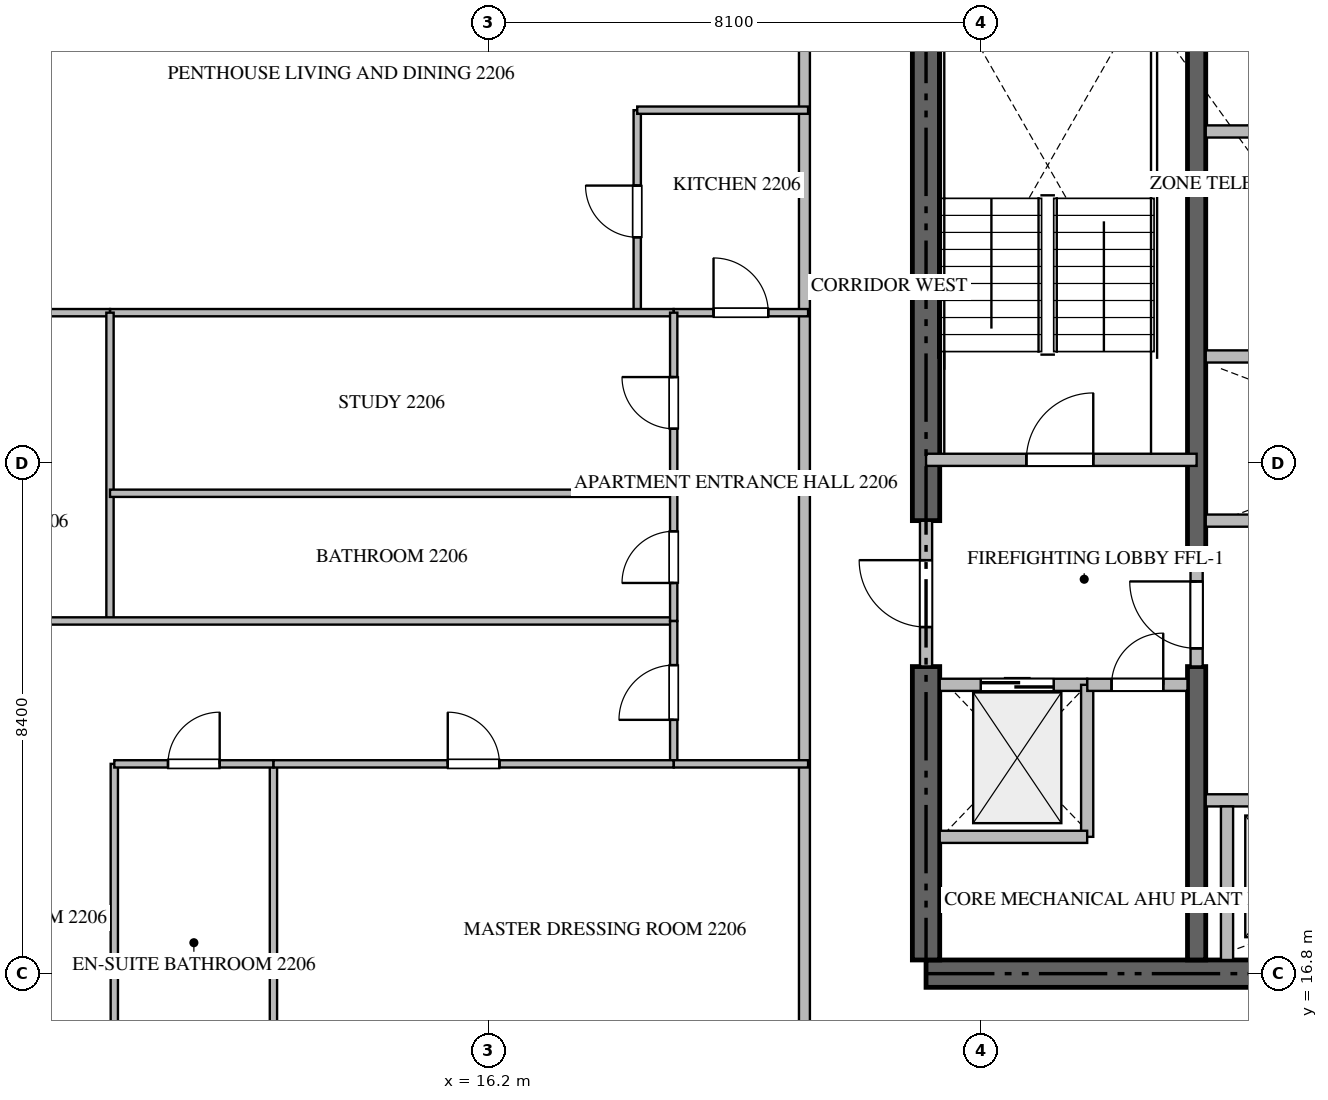
"""IFC4 building model, lengths in metres.
Left out: names, types, materials, properties, quantities, classifications, styles, units other than length and angle.
Written with IfcOpenShell. Run it as: python <this file> out.ifc"""

import sys

from ifc_helpers import new_model, si_unit, direction, frame, frame_2d, origin, place, context, subcontext, project, spatial, rectangle, extrude, source, transform, mapped, element, fill, save


model = new_model("IFC4")
c1 = context("Model", 3, precision=1e-05, world=origin(), true_north=direction((0.0, 1.0)))
c2 = subcontext(c1, "Body", "Model", "MODEL_VIEW")
j1 = project(units=[si_unit("LENGTHUNIT", "METRE"), si_unit("PLANEANGLEUNIT", "RADIAN")], contexts=[c1])
p1 = place(None, origin())
s1 = spatial("IfcSite", under=j1, at=p1, CompositionType="ELEMENT")
p2 = place(p1, origin())
s2 = spatial("IfcBuilding", under=s1, at=p2, CompositionType="ELEMENT")
p3 = place(p2, frame((0.0, 0.0, 90.45)))
s3 = spatial("IfcBuildingStorey", under=s2, at=p3, CompositionType="ELEMENT", Elevation=90.45)
p4 = place(p3, frame((23.4, 16.8, -0.26), z_axis=(0.0, 0.0, 1.0), x_axis=(1.0, 0.0, 0.0)))
e1 = element("IfcWall", 1, at=p4, inside=s3, PredefinedType="SHEAR", context=c2, shape_type="SweptSolid", body=[
    extrude(rectangle(XDim=18.0, YDim=0.45, at=frame_2d((9.0, 0.0))), origin(), (0.0, 0.0, 1.0), 3.748),
])
p5 = place(p3, frame((23.4, 17.025, -0.26), z_axis=(0.0, 0.0, 1.0), x_axis=(0.0, 1.0, 0.0)))
e2 = element("IfcWall", 2, at=p5, inside=s3, PredefinedType="SHEAR", context=c2, shape_type="SweptSolid", body=[
    extrude(rectangle(XDim=4.825, YDim=0.45, at=frame_2d((2.413, 0.0))), origin(), (0.0, 0.0, 1.0), 3.748),
])
p6 = place(p3, frame((23.4, 24.25, -0.26), z_axis=(0.0, 0.0, 1.0), x_axis=(0.0, 1.0, 0.0)))
e3 = element("IfcWall", 3, at=p6, inside=s3, PredefinedType="SHEAR", context=c2, shape_type="SweptSolid", body=[
    extrude(rectangle(XDim=9.125, YDim=0.45, at=frame_2d((4.562, 0.0))), origin(), (0.0, 0.0, 1.0), 3.748),
])
p7 = place(p3, frame((27.85, 17.025, -0.26), z_axis=(0.0, 0.0, 1.0), x_axis=(0.0, 1.0, 0.0)))
e4 = element("IfcWall", 4, at=p7, inside=s3, PredefinedType="SHEAR", context=c2, shape_type="SweptSolid", body=[
    extrude(rectangle(XDim=4.825, YDim=0.3, at=frame_2d((2.413, 0.0))), origin(), (0.0, 0.0, 1.0), 3.748),
])
p8 = place(p3, frame((27.85, 23.55, -0.26), z_axis=(0.0, 0.0, 1.0), x_axis=(0.0, 1.0, 0.0)))
e5 = element("IfcWall", 5, at=p8, inside=s3, PredefinedType="SHEAR", context=c2, shape_type="SweptSolid", body=[
    extrude(rectangle(XDim=9.825, YDim=0.3, at=frame_2d((4.913, 0.0))), origin(), (0.0, 0.0, 1.0), 3.748),
])
p9 = place(p3, frame((23.4, 25.25, 0.0), z_axis=(0.0, 0.0, 1.0), x_axis=(1.0, 0.0, 0.0)))
e6 = element("IfcWall", 6, at=p9, inside=s3, PredefinedType="STANDARD", context=c2, shape_type="SweptSolid", body=[
    extrude(rectangle(XDim=4.45, YDim=0.2, at=frame_2d((2.225, 0.0))), origin(), (0.0, 0.0, 1.0), 3.49),
])
p10 = place(p9, frame((1.65, 0.0, 0.0)))
e7 = element("IfcOpeningElement", 7, at=p10, cuts=e6, PredefinedType="OPENING", context=c2, shape_type="SweptSolid", body=[
    extrude(rectangle(XDim=1.1, YDim=2.15, at=frame_2d((0.55, 1.075))), frame((0.0, 0.11, 0.0), z_axis=(0.0, -1.0, 0.0), x_axis=(1.0, 0.0, 0.0)), (0.0, 0.0, 1.0), 0.22),
])
p11 = place(p3, frame((23.625, 21.55, 0.0), z_axis=(0.0, 0.0, 1.0), x_axis=(1.0, 0.0, 0.0)))
e8 = element("IfcWall", 8, at=p11, inside=s3, PredefinedType="STANDARD", context=c2, shape_type="SweptSolid", body=[
    extrude(rectangle(XDim=2.425, YDim=0.2, at=frame_2d((1.212, 0.0))), origin(), (0.0, 0.0, 1.0), 3.49),
])
p12 = place(p11, frame((0.675, 0.0, 0.0)))
e9 = element("IfcOpeningElement", 9, at=p12, cuts=e8, PredefinedType="OPENING", context=c2, shape_type="SweptSolid", body=[
    extrude(rectangle(XDim=1.2, YDim=2.2, at=frame_2d((0.6, 1.1))), frame((0.0, 0.11, 0.0), z_axis=(0.0, -1.0, 0.0), x_axis=(1.0, 0.0, 0.0)), (0.0, 0.0, 1.0), 0.22),
])
p13 = place(p3, frame((28.0, 19.65, 0.0), z_axis=(0.0, 0.0, 1.0), x_axis=(1.0, 0.0, 0.0)))
e10 = element("IfcWall", 10, at=p13, inside=s3, PredefinedType="STANDARD", context=c2, shape_type="SweptSolid", body=[
    extrude(rectangle(XDim=2.65, YDim=0.2, at=frame_2d((1.325, 0.0))), origin(), (0.0, 0.0, 1.0), 3.49),
])
p14 = place(p13, frame((0.9, 0.0, 0.0)))
e11 = element("IfcOpeningElement", 11, at=p14, cuts=e10, PredefinedType="OPENING", context=c2, shape_type="SweptSolid", body=[
    extrude(rectangle(XDim=1.1, YDim=2.2, at=frame_2d((0.55, 1.1))), frame((0.0, 0.11, 0.0), z_axis=(0.0, -1.0, 0.0), x_axis=(1.0, 0.0, 0.0)), (0.0, 0.0, 1.0), 0.22),
])
p15 = place(p3, frame((28.35, 17.025, 0.0), z_axis=(0.0, 0.0, 1.0), x_axis=(0.0, 1.0, 0.0)))
e12 = element("IfcWall", 12, at=p15, inside=s3, PredefinedType="STANDARD", context=c2, shape_type="SweptSolid", body=[
    extrude(rectangle(XDim=2.525, YDim=0.2, at=frame_2d((1.263, 0.0))), origin(), (0.0, 0.0, 1.0), 3.49),
])
p16 = place(p3, frame((28.0, 24.25, 0.0), z_axis=(0.0, 0.0, 1.0), x_axis=(1.0, 0.0, 0.0)))
e13 = element("IfcWall", 13, at=p16, inside=s3, PredefinedType="STANDARD", context=c2, shape_type="SweptSolid", body=[
    extrude(rectangle(XDim=2.425, YDim=0.2, at=frame_2d((1.212, 0.0))), origin(), (0.0, 0.0, 1.0), 3.49),
])
p17 = place(p3, frame((28.0, 30.65, 0.0), z_axis=(0.0, 0.0, 1.0), x_axis=(1.0, 0.0, 0.0)))
e14 = element("IfcWall", 14, at=p17, inside=s3, PredefinedType="STANDARD", context=c2, shape_type="SweptSolid", body=[
    extrude(rectangle(XDim=2.55, YDim=0.2, at=frame_2d((1.275, 0.0))), origin(), (0.0, 0.0, 1.0), 3.49),
])
p18 = place(p3, frame((26.05, 19.05, 0.0), z_axis=(0.0, 0.0, 1.0), x_axis=(0.0, 1.0, 0.0)))
e15 = element("IfcWall", 15, at=p18, inside=s3, PredefinedType="STANDARD", context=c2, shape_type="SweptSolid", body=[
    extrude(rectangle(XDim=2.5, YDim=0.2, at=frame_2d((1.25, 0.0))), origin(), (0.0, 0.0, 1.0), 3.49),
])
p19 = place(p3, frame((23.625, 19.05, 0.0), z_axis=(0.0, 0.0, 1.0), x_axis=(1.0, 0.0, 0.0)))
e16 = element("IfcWall", 16, at=p19, inside=s3, PredefinedType="STANDARD", context=c2, shape_type="SweptSolid", body=[
    extrude(rectangle(XDim=2.425, YDim=0.2, at=frame_2d((1.212, 0.0))), origin(), (0.0, 0.0, 1.0), 3.49),
])
p20 = place(p3, frame((26.052, 21.55, 0.0), z_axis=(0.0, 0.0, 1.0), x_axis=(1.0, 0.0, 0.0)))
e17 = element("IfcWall", 17, at=p20, inside=s3, PredefinedType="STANDARD", context=c2, shape_type="SweptSolid", body=[
    extrude(rectangle(XDim=1.648, YDim=0.2, at=frame_2d((0.824, 0.0))), origin(), (0.0, 0.0, 1.0), 3.49),
])
p21 = place(p20, frame((0.399, 0.0, 0.0)))
e18 = element("IfcOpeningElement", 18, at=p21, cuts=e17, PredefinedType="OPENING", context=c2, shape_type="SweptSolid", body=[
    extrude(rectangle(XDim=0.85, YDim=2.1, at=frame_2d((0.425, 1.05))), frame((0.0, 0.11, 0.0), z_axis=(0.0, -1.0, 0.0), x_axis=(1.0, 0.0, 0.0)), (0.0, 0.0, 1.0), 0.22),
])
p22 = place(p3, frame((23.4, 21.852, 0.0), z_axis=(0.0, 0.0, 1.0), x_axis=(0.0, 1.0, 0.0)))
e19 = element("IfcWall", 19, at=p22, inside=s3, PredefinedType="STANDARD", context=c2, shape_type="SweptSolid", body=[
    extrude(rectangle(XDim=2.396, YDim=0.2, at=frame_2d((1.198, 0.0))), origin(), (0.0, 0.0, 1.0), 3.49),
])
p23 = place(p22, frame((0.648, 0.0, 0.0)))
e20 = element("IfcOpeningElement", 20, at=p23, cuts=e19, PredefinedType="OPENING", context=c2, shape_type="SweptSolid", body=[
    extrude(rectangle(XDim=1.1, YDim=2.15, at=frame_2d((0.55, 1.075))), frame((0.0, 0.11, 0.0), z_axis=(0.0, -1.0, 0.0), x_axis=(1.0, 0.0, 0.0)), (0.0, 0.0, 1.0), 0.22),
])
p24 = place(p3, frame((27.85, 21.852, 0.0), z_axis=(0.0, 0.0, 1.0), x_axis=(0.0, 1.0, 0.0)))
e21 = element("IfcWall", 21, at=p24, inside=s3, PredefinedType="STANDARD", context=c2, shape_type="SweptSolid", body=[
    extrude(rectangle(XDim=1.696, YDim=0.2, at=frame_2d((0.848, 0.0))), origin(), (0.0, 0.0, 1.0), 3.49),
])
p25 = place(p24, frame((0.298, 0.0, 0.0)))
e22 = element("IfcOpeningElement", 22, at=p25, cuts=e21, PredefinedType="OPENING", context=c2, shape_type="SweptSolid", body=[
    extrude(rectangle(XDim=1.1, YDim=2.15, at=frame_2d((0.55, 1.075))), frame((0.0, 0.11, 0.0), z_axis=(0.0, -1.0, 0.0), x_axis=(1.0, 0.0, 0.0)), (0.0, 0.0, 1.0), 0.22),
])
p26 = place(p3, frame((28.0, 26.95, 0.0), z_axis=(0.0, 0.0, 1.0), x_axis=(1.0, 0.0, 0.0)))
e23 = element("IfcWall", 23, at=p26, inside=s3, PredefinedType="STANDARD", context=c2, shape_type="SweptSolid", body=[
    extrude(rectangle(XDim=6.95, YDim=0.2, at=frame_2d((3.475, 0.0))), origin(), (0.0, 0.0, 1.0), 3.49),
])
p27 = place(p3, frame((21.4, 14.9, 0.0), z_axis=(0.0, 0.0, 1.0), x_axis=(0.0, 1.0, 0.0)))
e24 = element("IfcWall", 24, at=p27, inside=s3, PredefinedType="PARTITIONING", context=c2, shape_type="SweptSolid", body=[
    extrude(rectangle(XDim=20.6, YDim=0.18, at=frame_2d((10.3, 0.0))), origin(), (0.0, 0.0, 1.0), 3.49),
])
p28 = place(p27, frame((17.64, 0.0, 0.0)))
e25 = element("IfcOpeningElement", 25, at=p28, cuts=e24, PredefinedType="OPENING", context=c2, shape_type="SweptSolid", body=[
    extrude(rectangle(XDim=1.0, YDim=2.15, at=frame_2d((0.5, 1.075))), frame((0.0, 0.1, 0.0), z_axis=(0.0, -1.0, 0.0), x_axis=(1.0, 0.0, 0.0)), (0.0, 0.0, 1.0), 0.2),
])
p29 = place(p3, frame((18.65, 27.67, 0.0), z_axis=(0.0, 0.0, 1.0), x_axis=(0.0, 1.0, 0.0)))
e26 = element("IfcWall", 26, at=p29, inside=s3, PredefinedType="PARTITIONING", context=c2, shape_type="SweptSolid", body=[
    extrude(rectangle(XDim=3.33, YDim=0.12, at=frame_2d((1.665, 0.0))), origin(), (0.0, 0.0, 1.0), 3.49),
])
p30 = place(p29, frame((1.24, 0.0, 0.0)))
e27 = element("IfcOpeningElement", 27, at=p30, cuts=e26, PredefinedType="OPENING", context=c2, shape_type="SweptSolid", body=[
    extrude(rectangle(XDim=0.85, YDim=2.1, at=frame_2d((0.425, 1.05))), frame((0.0, 0.07, 0.0), z_axis=(0.0, -1.0, 0.0), x_axis=(1.0, 0.0, 0.0)), (0.0, 0.0, 1.0), 0.14),
])
p31 = place(p3, frame((18.65, 31.0, 0.0), z_axis=(0.0, 0.0, 1.0), x_axis=(1.0, 0.0, 0.0)))
e28 = element("IfcWall", 28, at=p31, inside=s3, PredefinedType="PARTITIONING", context=c2, shape_type="SweptSolid", body=[
    extrude(rectangle(XDim=2.81, YDim=0.12, at=frame_2d((1.405, 0.0))), origin(), (0.0, 0.0, 1.0), 3.49),
])
p32 = place(p3, frame((19.25, 27.67, 0.0), z_axis=(0.0, 0.0, 1.0), x_axis=(1.0, 0.0, 0.0)))
e29 = element("IfcWall", 29, at=p32, inside=s3, PredefinedType="PARTITIONING", context=c2, shape_type="SweptSolid", body=[
    extrude(rectangle(XDim=2.21, YDim=0.12, at=frame_2d((1.105, 0.0))), origin(), (0.0, 0.0, 1.0), 3.49),
])
p33 = place(p32, frame((0.655, 0.0, 0.0)))
e30 = element("IfcOpeningElement", 30, at=p33, cuts=e29, PredefinedType="OPENING", context=c2, shape_type="SweptSolid", body=[
    extrude(rectangle(XDim=0.9, YDim=2.1, at=frame_2d((0.45, 1.05))), frame((0.0, 0.07, 0.0), z_axis=(0.0, -1.0, 0.0), x_axis=(1.0, 0.0, 0.0)), (0.0, 0.0, 1.0), 0.14),
])
p34 = place(p3, frame((6.095, 27.67, 0.0), z_axis=(0.0, 0.0, 1.0), x_axis=(1.0, 0.0, 0.0)))
e31 = element("IfcWall", 31, at=p34, inside=s3, PredefinedType="PARTITIONING", context=c2, shape_type="SweptSolid", body=[
    extrude(rectangle(XDim=3.884, YDim=0.12, at=frame_2d((1.942, 0.0))), origin(), (0.0, 0.0, 1.0), 3.49),
])
p35 = place(p34, frame((1.781, 0.0, 0.0)))
e32 = element("IfcOpeningElement", 32, at=p35, cuts=e31, PredefinedType="OPENING", context=c2, shape_type="SweptSolid", body=[
    extrude(rectangle(XDim=0.9, YDim=2.1, at=frame_2d((0.45, 1.05))), frame((0.0, 0.07, 0.0), z_axis=(0.0, -1.0, 0.0), x_axis=(1.0, 0.0, 0.0)), (0.0, 0.0, 1.0), 0.14),
])
p36 = place(p3, frame((9.981, 27.67, 0.0), z_axis=(0.0, 0.0, 1.0), x_axis=(1.0, 0.0, 0.0)))
e33 = element("IfcWall", 33, at=p36, inside=s3, PredefinedType="PARTITIONING", context=c2, shape_type="SweptSolid", body=[
    extrude(rectangle(XDim=9.267, YDim=0.12, at=frame_2d((4.634, 0.0))), origin(), (0.0, 0.0, 1.0), 3.49),
])
p37 = place(p3, frame((9.979, 22.6, 0.0), z_axis=(0.0, 0.0, 1.0), x_axis=(0.0, 1.0, 0.0)))
e34 = element("IfcWall", 34, at=p37, inside=s3, PredefinedType="PARTITIONING", context=c2, shape_type="SweptSolid", body=[
    extrude(rectangle(XDim=5.07, YDim=0.12, at=frame_2d((2.535, 0.0))), origin(), (0.0, 0.0, 1.0), 3.49),
])
p38 = place(p3, frame((6.095, 22.6, 0.0), z_axis=(0.0, 0.0, 1.0), x_axis=(1.0, 0.0, 0.0)))
e35 = element("IfcWall", 35, at=p38, inside=s3, PredefinedType="PARTITIONING", context=c2, shape_type="SweptSolid", body=[
    extrude(rectangle(XDim=13.155, YDim=0.12, at=frame_2d((6.578, 0.0))), origin(), (0.0, 0.0, 1.0), 3.49),
])
p39 = place(p3, frame((9.979, 24.7, 0.0), z_axis=(0.0, 0.0, 1.0), x_axis=(1.0, 0.0, 0.0)))
e36 = element("IfcWall", 36, at=p39, inside=s3, PredefinedType="PARTITIONING", context=c2, shape_type="SweptSolid", body=[
    extrude(rectangle(XDim=9.271, YDim=0.12, at=frame_2d((4.635, 0.0))), origin(), (0.0, 0.0, 1.0), 3.49),
])
p40 = place(p3, frame((19.25, 22.6, 0.0), z_axis=(0.0, 0.0, 1.0), x_axis=(0.0, 1.0, 0.0)))
e37 = element("IfcWall", 37, at=p40, inside=s3, PredefinedType="PARTITIONING", context=c2, shape_type="SweptSolid", body=[
    extrude(rectangle(XDim=2.1, YDim=0.12, at=frame_2d((1.05, 0.0))), origin(), (0.0, 0.0, 1.0), 3.49),
])
p41 = place(p40, frame((0.625, 0.0, 0.0)))
e38 = element("IfcOpeningElement", 38, at=p41, cuts=e37, PredefinedType="OPENING", context=c2, shape_type="SweptSolid", body=[
    extrude(rectangle(XDim=0.85, YDim=2.1, at=frame_2d((0.425, 1.05))), frame((0.0, 0.07, 0.0), z_axis=(0.0, -1.0, 0.0), x_axis=(1.0, 0.0, 0.0)), (0.0, 0.0, 1.0), 0.14),
])
p42 = place(p3, frame((19.25, 24.702, 0.0), z_axis=(0.0, 0.0, 1.0), x_axis=(0.0, 1.0, 0.0)))
e39 = element("IfcWall", 39, at=p42, inside=s3, PredefinedType="PARTITIONING", context=c2, shape_type="SweptSolid", body=[
    extrude(rectangle(XDim=2.968, YDim=0.12, at=frame_2d((1.484, 0.0))), origin(), (0.0, 0.0, 1.0), 3.49),
])
p43 = place(p42, frame((1.059, 0.0, 0.0)))
e40 = element("IfcOpeningElement", 40, at=p43, cuts=e39, PredefinedType="OPENING", context=c2, shape_type="SweptSolid", body=[
    extrude(rectangle(XDim=0.85, YDim=2.1, at=frame_2d((0.425, 1.05))), frame((0.0, 0.07, 0.0), z_axis=(0.0, -1.0, 0.0), x_axis=(1.0, 0.0, 0.0)), (0.0, 0.0, 1.0), 0.14),
])
p44 = place(p3, frame((19.25, 20.25, 0.0), z_axis=(0.0, 0.0, 1.0), x_axis=(0.0, 1.0, 0.0)))
e41 = element("IfcWall", 41, at=p44, inside=s3, PredefinedType="PARTITIONING", context=c2, shape_type="SweptSolid", body=[
    extrude(rectangle(XDim=2.348, YDim=0.12, at=frame_2d((1.174, 0.0))), origin(), (0.0, 0.0, 1.0), 3.49),
])
p45 = place(p44, frame((0.724, 0.0, 0.0)))
e42 = element("IfcOpeningElement", 42, at=p45, cuts=e41, PredefinedType="OPENING", context=c2, shape_type="SweptSolid", body=[
    extrude(rectangle(XDim=0.9, YDim=2.1, at=frame_2d((0.45, 1.05))), frame((0.0, 0.07, 0.0), z_axis=(0.0, -1.0, 0.0), x_axis=(1.0, 0.0, 0.0)), (0.0, 0.0, 1.0), 0.14),
])
for number, where, z_axis, x_axis in (
    (43, (10.05, 14.84, 0.0), (0.0, 0.0, 1.0), (0.0, 1.0, 0.0)),
    (44, (12.667, 14.84, 0.0), (0.0, 0.0, 1.0), (0.0, 1.0, 0.0)),
):
    element("IfcWall", number, at=place(p3, frame(where, z_axis=z_axis, x_axis=x_axis)), inside=s3, PredefinedType="PARTITIONING", context=c2, shape_type="SweptSolid", body=[
        extrude(rectangle(XDim=5.41, YDim=0.12, at=frame_2d((2.705, 0.0))), origin(), (0.0, 0.0, 1.0), 3.49),
    ])
p46 = place(p3, frame((10.05, 20.25, 0.0), z_axis=(0.0, 0.0, 1.0), x_axis=(1.0, 0.0, 0.0)))
e45 = element("IfcWall", 45, at=p46, inside=s3, PredefinedType="PARTITIONING", context=c2, shape_type="SweptSolid", body=[
    extrude(rectangle(XDim=2.617, YDim=0.12, at=frame_2d((1.309, 0.0))), origin(), (0.0, 0.0, 1.0), 3.49),
])
p47 = place(p46, frame((0.883, 0.0, 0.0)))
e46 = element("IfcOpeningElement", 46, at=p47, cuts=e45, PredefinedType="OPENING", context=c2, shape_type="SweptSolid", body=[
    extrude(rectangle(XDim=0.85, YDim=2.1, at=frame_2d((0.425, 1.05))), frame((0.0, 0.07, 0.0), z_axis=(0.0, -1.0, 0.0), x_axis=(1.0, 0.0, 0.0)), (0.0, 0.0, 1.0), 0.14),
])
p48 = place(p3, frame((12.669, 20.25, 0.0), z_axis=(0.0, 0.0, 1.0), x_axis=(1.0, 0.0, 0.0)))
e47 = element("IfcWall", 47, at=p48, inside=s3, PredefinedType="PARTITIONING", context=c2, shape_type="SweptSolid", body=[
    extrude(rectangle(XDim=6.581, YDim=0.12, at=frame_2d((3.291, 0.0))), origin(), (0.0, 0.0, 1.0), 3.49),
])
p49 = place(p48, frame((2.865, 0.0, 0.0)))
e48 = element("IfcOpeningElement", 48, at=p49, cuts=e47, PredefinedType="OPENING", context=c2, shape_type="SweptSolid", body=[
    extrude(rectangle(XDim=0.85, YDim=2.1, at=frame_2d((0.425, 1.05))), frame((0.0, 0.07, 0.0), z_axis=(0.0, -1.0, 0.0), x_axis=(1.0, 0.0, 0.0)), (0.0, 0.0, 1.0), 0.14),
])
p50 = place(p3, frame((19.252, 20.25, 0.0), z_axis=(0.0, 0.0, 1.0), x_axis=(1.0, 0.0, 0.0)))
e49 = element("IfcWall", 49, at=p50, inside=s3, PredefinedType="PARTITIONING", context=c2, shape_type="SweptSolid", body=[
    extrude(rectangle(XDim=2.208, YDim=0.12, at=frame_2d((1.104, 0.0))), origin(), (0.0, 0.0, 1.0), 3.49),
])
m1 = source(origin(), c2, "Body", "SweptSolid", [
    extrude(rectangle(XDim=1.1, YDim=2.15, at=frame_2d((0.55, 1.075))), frame((0.0, 0.025, 0.0), z_axis=(0.0, -1.0, 0.0), x_axis=(1.0, 0.0, 0.0)), (0.0, 0.0, 1.0), 0.05),
])
p51 = place(p10, origin())
e50 = element("IfcDoor", 50, at=p51, inside=s3, OperationType="SINGLE_SWING_RIGHT", PredefinedType="DOOR", context=c2, shape_type="MappedRepresentation", body=[
    mapped(m1, transform((0.0, 0.0, 0.0), scale=1.0)),
])
fill(e7, e50)
m2 = source(origin(), c2, "Body", "SweptSolid", [
    extrude(rectangle(XDim=1.2, YDim=2.2, at=frame_2d((0.6, 1.1))), frame((0.0, 0.025, 0.0), z_axis=(0.0, -1.0, 0.0), x_axis=(1.0, 0.0, 0.0)), (0.0, 0.0, 1.0), 0.05),
])
p52 = place(p12, origin())
e51 = element("IfcDoor", 51, at=p52, inside=s3, OperationType="DOUBLE_DOOR_SLIDING", PredefinedType="DOOR", context=c2, shape_type="MappedRepresentation", body=[
    mapped(m2, transform((0.0, 0.0, 0.0), scale=1.0)),
])
fill(e9, e51)
m3 = source(origin(), c2, "Body", "SweptSolid", [
    extrude(rectangle(XDim=0.85, YDim=2.1, at=frame_2d((0.425, 1.05))), frame((0.0, 0.025, 0.0), z_axis=(0.0, -1.0, 0.0), x_axis=(1.0, 0.0, 0.0)), (0.0, 0.0, 1.0), 0.05),
])
p53 = place(p21, origin())
e52 = element("IfcDoor", 52, at=p53, inside=s3, OperationType="SINGLE_SWING_RIGHT", PredefinedType="DOOR", context=c2, shape_type="MappedRepresentation", body=[
    mapped(m3, transform((0.0, 0.0, 0.0), scale=1.0)),
])
fill(e18, e52)
p54 = place(p23, origin())
e53 = element("IfcDoor", 53, at=p54, inside=s3, OperationType="SINGLE_SWING_RIGHT", PredefinedType="DOOR", context=c2, shape_type="MappedRepresentation", body=[
    mapped(m1, transform((0.0, 0.0, 0.0), scale=1.0)),
])
fill(e20, e53)
p55 = place(p25, origin())
e54 = element("IfcDoor", 54, at=p55, inside=s3, OperationType="SINGLE_SWING_RIGHT", PredefinedType="DOOR", context=c2, shape_type="MappedRepresentation", body=[
    mapped(m1, transform((0.0, 0.0, 0.0), scale=1.0)),
])
fill(e22, e54)
p56 = place(p30, origin())
e55 = element("IfcDoor", 55, at=p56, inside=s3, OperationType="SINGLE_SWING_RIGHT", PredefinedType="DOOR", context=c2, shape_type="MappedRepresentation", body=[
    mapped(m3, transform((0.0, 0.0, 0.0), scale=1.0)),
])
fill(e27, e55)
m4 = source(origin(), c2, "Body", "SweptSolid", [
    extrude(rectangle(XDim=0.9, YDim=2.1, at=frame_2d((0.45, 1.05))), frame((0.0, 0.025, 0.0), z_axis=(0.0, -1.0, 0.0), x_axis=(1.0, 0.0, 0.0)), (0.0, 0.0, 1.0), 0.05),
])
p57 = place(p33, origin())
e56 = element("IfcDoor", 56, at=p57, inside=s3, OperationType="SINGLE_SWING_LEFT", PredefinedType="DOOR", context=c2, shape_type="MappedRepresentation", body=[
    mapped(m4, transform((0.0, 0.0, 0.0), scale=1.0)),
])
fill(e30, e56)
p58 = place(p41, origin())
e57 = element("IfcDoor", 57, at=p58, inside=s3, OperationType="SINGLE_SWING_LEFT", PredefinedType="DOOR", context=c2, shape_type="MappedRepresentation", body=[
    mapped(m3, transform((0.0, 0.0, 0.0), scale=1.0)),
])
fill(e38, e57)
p59 = place(p43, origin())
e58 = element("IfcDoor", 58, at=p59, inside=s3, OperationType="SINGLE_SWING_RIGHT", PredefinedType="DOOR", context=c2, shape_type="MappedRepresentation", body=[
    mapped(m3, transform((0.0, 0.0, 0.0), scale=1.0)),
])
fill(e40, e58)
p60 = place(p45, origin())
e59 = element("IfcDoor", 59, at=p60, inside=s3, OperationType="SINGLE_SWING_LEFT", PredefinedType="DOOR", context=c2, shape_type="MappedRepresentation", body=[
    mapped(m4, transform((0.0, 0.0, 0.0), scale=1.0)),
])
fill(e42, e59)
p61 = place(p47, origin())
e60 = element("IfcDoor", 60, at=p61, inside=s3, OperationType="SINGLE_SWING_RIGHT", PredefinedType="DOOR", context=c2, shape_type="MappedRepresentation", body=[
    mapped(m3, transform((0.0, 0.0, 0.0), scale=1.0)),
])
fill(e46, e60)
p62 = place(p49, origin())
e61 = element("IfcDoor", 61, at=p62, inside=s3, OperationType="SINGLE_SWING_LEFT", PredefinedType="DOOR", context=c2, shape_type="MappedRepresentation", body=[
    mapped(m3, transform((0.0, 0.0, 0.0), scale=1.0)),
])
fill(e48, e61)
save(model, sys.argv[1])
